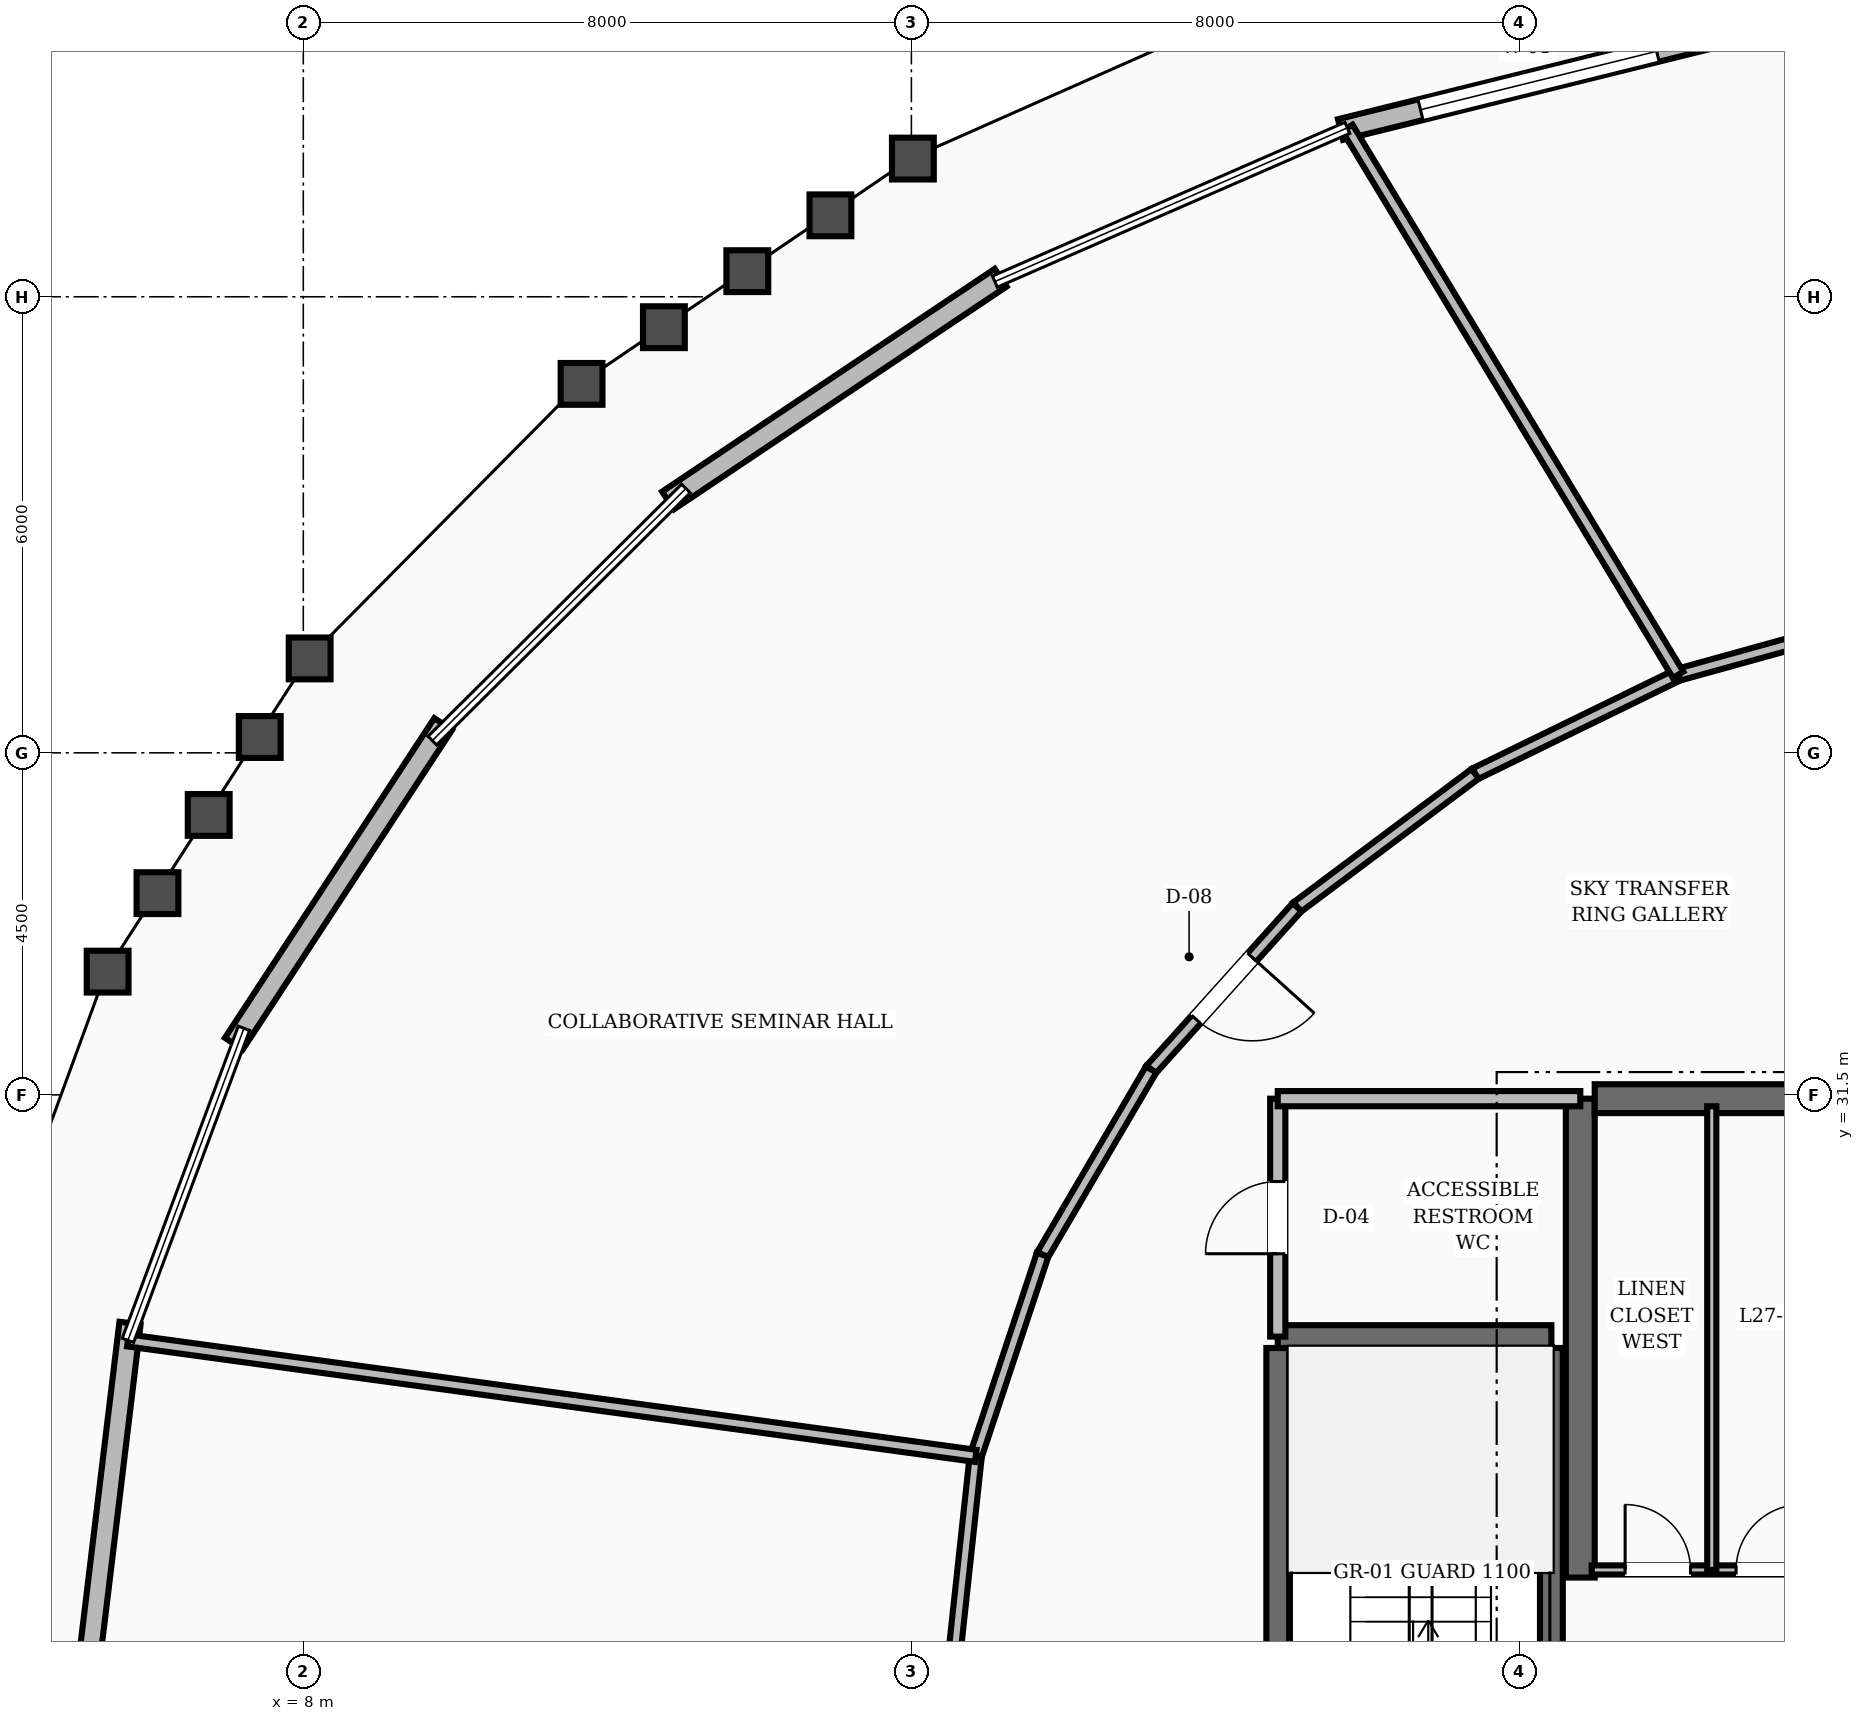
"""IFC4 building model, lengths in metres.
Left out: names, types, materials, properties, quantities, classifications, styles, units other than length and angle.
Written with IfcOpenShell. Run it as: python <this file> out.ifc"""

import sys

from ifc_helpers import new_model, si_unit, direction, frame, frame_2d, origin, place, context, subcontext, project, spatial, rectangle, extrude, element, fill, save


model = new_model("IFC4")
c1 = context("Model", 3, precision=1e-05, world=origin(), true_north=direction((0.0, 1.0)))
c2 = subcontext(c1, "Body", "Model", "MODEL_VIEW")
j1 = project(units=[si_unit("LENGTHUNIT", "METRE"), si_unit("PLANEANGLEUNIT", "RADIAN")], contexts=[c1])
p1 = place(None, origin())
s1 = spatial("IfcSite", under=j1, at=p1, CompositionType="ELEMENT")
p2 = place(p1, origin())
s2 = spatial("IfcBuilding", under=s1, at=p2, CompositionType="ELEMENT")
p3 = place(p2, frame((0.0, 0.0, 106.0)))
s3 = spatial("IfcBuildingStorey", under=s2, at=p3, CompositionType="ELEMENT", Elevation=106.0)
p4 = place(p3, frame((24.8, 25.15, 0.0), z_axis=(0.0, 0.0, 1.0), x_axis=(0.0, 1.0, 0.0)))
e1 = element("IfcWall", 1, at=p4, inside=s3, PredefinedType="SHEAR", context=c2, shape_type="SweptSolid", body=[
    extrude(rectangle(XDim=6.3, YDim=0.38, at=frame_2d((3.15, 0.0))), origin(), (0.0, 0.0, 1.0), 4.8),
])
p5 = place(p3, frame((24.99, 31.45, 0.0), z_axis=(0.0, 0.0, 1.0), x_axis=(1.0, 0.0, 0.0)))
e2 = element("IfcWall", 2, at=p5, inside=s3, PredefinedType="SHEAR", context=c2, shape_type="SweptSolid", body=[
    extrude(rectangle(XDim=3.21, YDim=0.38, at=frame_2d((1.605, 0.0))), origin(), (0.0, 0.0, 1.0), 4.8),
])
for number, where, z_axis, x_axis in (
    (3, (20.82, 19.43, 0.0), (0.0, 0.0, 1.0), (0.0, 1.0, 0.0)),
    (4, (24.42, 19.43, 0.0), (0.0, 0.0, 1.0), (0.0, 1.0, 0.0)),
):
    element("IfcWall", number, at=place(p3, frame(where, z_axis=z_axis, x_axis=x_axis)), inside=s3, PredefinedType="SHEAR", context=c2, shape_type="SweptSolid", body=[
        extrude(rectangle(XDim=8.74, YDim=0.3, at=frame_2d((4.37, 0.0))), origin(), (0.0, 0.0, 1.0), 4.8),
    ])
p6 = place(p3, frame((20.82, 28.32, 0.0), z_axis=(0.0, 0.0, 1.0), x_axis=(1.0, 0.0, 0.0)))
e5 = element("IfcWall", 5, at=p6, inside=s3, PredefinedType="SHEAR", context=c2, shape_type="SweptSolid", body=[
    extrude(rectangle(XDim=3.6, YDim=0.3, at=frame_2d((1.8, 0.0))), origin(), (0.0, 0.0, 1.0), 4.8),
])
p7 = place(p3, frame((26.856, 45.49, 0.0), z_axis=(0.0, 0.0, 1.0), x_axis=(-0.9707123559, -0.240244712954, 0.0)))
e6 = element("IfcWall", 6, at=p7, inside=s3, PredefinedType="STANDARD", context=c2, shape_type="SweptSolid", body=[
    extrude(rectangle(XDim=5.368, YDim=0.28, at=frame_2d((2.684, 0.0))), origin(), (0.0, 0.0, 1.0), 3.71),
])
p8 = place(p7, frame((1.084, 0.0, 0.8)))
e7 = element("IfcOpeningElement", 7, at=p8, cuts=e6, PredefinedType="OPENING", context=c2, shape_type="SweptSolid", body=[
    extrude(rectangle(XDim=3.2, YDim=1.65, at=frame_2d((1.6, 0.825))), frame((0.0, 0.15, 0.0), z_axis=(0.0, -1.0, 0.0), x_axis=(1.0, 0.0, 0.0)), (0.0, 0.0, 1.0), 0.3),
])
p9 = place(p3, frame((17.174, 42.25, 0.0), z_axis=(0.0, 0.0, 1.0), x_axis=(-0.830878855803, -0.556453346633, 0.0)))
e8 = element("IfcWall", 8, at=p9, inside=s3, PredefinedType="STANDARD", context=c2, shape_type="SweptSolid", body=[
    extrude(rectangle(XDim=5.267, YDim=0.28, at=frame_2d((2.633, 0.0))), origin(), (0.0, 0.0, 1.0), 3.71),
])
p10 = place(p3, frame((9.84, 36.378, 0.0), z_axis=(0.0, 0.0, 1.0), x_axis=(-0.54792313188, -0.836528685432, 0.0)))
e9 = element("IfcWall", 9, at=p10, inside=s3, PredefinedType="STANDARD", context=c2, shape_type="SweptSolid", body=[
    extrude(rectangle(XDim=5.027, YDim=0.28, at=frame_2d((2.513, 0.0))), origin(), (0.0, 0.0, 1.0), 3.71),
])
p11 = place(p3, frame((5.72, 28.498, 0.0), z_axis=(0.0, 0.0, 1.0), x_axis=(-0.119800970217, -0.992797928853, 0.0)))
e10 = element("IfcWall", 10, at=p11, inside=s3, PredefinedType="STANDARD", context=c2, shape_type="SweptSolid", body=[
    extrude(rectangle(XDim=4.756, YDim=0.28, at=frame_2d((2.378, 0.0))), origin(), (0.0, 0.0, 1.0), 3.71),
])
p12 = place(p3, frame((20.82, 28.32, 0.0), z_axis=(0.0, 0.0, 1.0), x_axis=(0.0, 1.0, 0.0)))
e11 = element("IfcWall", 11, at=p12, inside=s3, PredefinedType="SOLIDWALL", context=c2, shape_type="SweptSolid", body=[
    extrude(rectangle(XDim=3.13, YDim=0.2, at=frame_2d((1.565, 0.0))), origin(), (0.0, 0.0, 1.0), 3.71),
])
p13 = place(p12, frame((1.09, 0.0, 0.0)))
e12 = element("IfcOpeningElement", 12, at=p13, cuts=e11, PredefinedType="OPENING", context=c2, shape_type="SweptSolid", body=[
    extrude(rectangle(XDim=0.95, YDim=2.1, at=frame_2d((0.475, 1.05))), frame((0.0, 0.11, 0.0), z_axis=(0.0, -1.0, 0.0), x_axis=(1.0, 0.0, 0.0)), (0.0, 0.0, 1.0), 0.22),
])
p14 = place(p3, frame((20.82, 31.45, 0.0), z_axis=(0.0, 0.0, 1.0), x_axis=(1.0, 0.0, 0.0)))
e13 = element("IfcWall", 13, at=p14, inside=s3, PredefinedType="SOLIDWALL", context=c2, shape_type="SweptSolid", body=[
    extrude(rectangle(XDim=3.98, YDim=0.2, at=frame_2d((1.99, 0.0))), origin(), (0.0, 0.0, 1.0), 3.71),
])
p15 = place(p3, frame((24.95, 25.25, 0.0), z_axis=(0.0, 0.0, 1.0), x_axis=(1.0, 0.0, 0.0)))
e14 = element("IfcWall", 14, at=p15, inside=s3, PredefinedType="PARTITIONING", context=c2, shape_type="SweptSolid", body=[
    extrude(rectangle(XDim=3.2, YDim=0.12, at=frame_2d((1.6, 0.0))), origin(), (0.0, 0.0, 1.0), 3.71),
])
p16 = place(p15, frame((0.44, 0.0, 0.0)))
e15 = element("IfcOpeningElement", 15, at=p16, cuts=e14, PredefinedType="OPENING", context=c2, shape_type="SweptSolid", body=[
    extrude(rectangle(XDim=0.86, YDim=2.1, at=frame_2d((0.43, 1.05))), frame((0.0, 0.07, 0.0), z_axis=(0.0, -1.0, 0.0), x_axis=(1.0, 0.0, 0.0)), (0.0, 0.0, 1.0), 0.14),
])
p17 = place(p15, frame((1.9, 0.0, 0.0)))
e16 = element("IfcOpeningElement", 16, at=p17, cuts=e14, PredefinedType="OPENING", context=c2, shape_type="SweptSolid", body=[
    extrude(rectangle(XDim=0.86, YDim=2.1, at=frame_2d((0.43, 1.05))), frame((0.0, 0.07, 0.0), z_axis=(0.0, -1.0, 0.0), x_axis=(1.0, 0.0, 0.0)), (0.0, 0.0, 1.0), 0.14),
])
p18 = place(p3, frame((26.53, 25.25, 0.0), z_axis=(0.0, 0.0, 1.0), x_axis=(0.0, 1.0, 0.0)))
e17 = element("IfcWall", 17, at=p18, inside=s3, PredefinedType="PARTITIONING", context=c2, shape_type="SweptSolid", body=[
    extrude(rectangle(XDim=6.1, YDim=0.12, at=frame_2d((3.05, 0.0))), origin(), (0.0, 0.0, 1.0), 3.71),
])
p19 = place(p3, frame((28.986, 37.829, 0.0), z_axis=(0.0, 0.0, 1.0), x_axis=(-0.963743190464, -0.26683152519, 0.0)))
e18 = element("IfcWall", 18, at=p19, inside=s3, PredefinedType="SOLIDWALL", context=c2, shape_type="SweptSolid", body=[
    extrude(rectangle(XDim=3.008, YDim=0.16, at=frame_2d((1.504, 0.0))), origin(), (0.0, 0.0, 1.0), 3.71),
])
p20 = place(p3, frame((26.087, 37.027, 0.0), z_axis=(0.0, 0.0, 1.0), x_axis=(-0.898755022802, -0.438451147778, 0.0)))
e19 = element("IfcWall", 19, at=p20, inside=s3, PredefinedType="SOLIDWALL", context=c2, shape_type="SweptSolid", body=[
    extrude(rectangle(XDim=2.972, YDim=0.16, at=frame_2d((1.486, 0.0))), origin(), (0.0, 0.0, 1.0), 3.71),
])
p21 = place(p3, frame((23.417, 35.724, 0.0), z_axis=(0.0, 0.0, 1.0), x_axis=(-0.800420462314, -0.599438973966, 0.0)))
e20 = element("IfcWall", 20, at=p21, inside=s3, PredefinedType="SOLIDWALL", context=c2, shape_type="SweptSolid", body=[
    extrude(rectangle(XDim=2.925, YDim=0.16, at=frame_2d((1.462, 0.0))), origin(), (0.0, 0.0, 1.0), 3.71),
])
p22 = place(p3, frame((21.075, 33.97, 0.0), z_axis=(0.0, 0.0, 1.0), x_axis=(-0.668645478294, -0.743581350194, 0.0)))
e21 = element("IfcWall", 21, at=p22, inside=s3, PredefinedType="SOLIDWALL", context=c2, shape_type="SweptSolid", body=[
    extrude(rectangle(XDim=2.874, YDim=0.16, at=frame_2d((1.437, 0.0))), origin(), (0.0, 0.0, 1.0), 3.71),
])
p23 = place(p22, frame((0.887, 0.0, 0.0)))
e22 = element("IfcOpeningElement", 22, at=p23, cuts=e21, PredefinedType="OPENING", context=c2, shape_type="SweptSolid", body=[
    extrude(rectangle(XDim=1.1, YDim=2.1, at=frame_2d((0.55, 1.05))), frame((0.0, 0.09, 0.0), z_axis=(0.0, -1.0, 0.0), x_axis=(1.0, 0.0, 0.0)), (0.0, 0.0, 1.0), 0.18),
])
p24 = place(p3, frame((19.154, 31.833, 0.0), z_axis=(0.0, 0.0, 1.0), x_axis=(-0.505380130961, -0.862896820732, 0.0)))
e23 = element("IfcWall", 23, at=p24, inside=s3, PredefinedType="SOLIDWALL", context=c2, shape_type="SweptSolid", body=[
    extrude(rectangle(XDim=2.825, YDim=0.16, at=frame_2d((1.413, 0.0))), origin(), (0.0, 0.0, 1.0), 3.71),
])
p25 = place(p3, frame((17.726, 29.396, 0.0), z_axis=(0.0, 0.0, 1.0), x_axis=(-0.315413058649, -0.948954478589, 0.0)))
e24 = element("IfcWall", 24, at=p25, inside=s3, PredefinedType="SOLIDWALL", context=c2, shape_type="SweptSolid", body=[
    extrude(rectangle(XDim=2.787, YDim=0.16, at=frame_2d((1.394, 0.0))), origin(), (0.0, 0.0, 1.0), 3.71),
])
p26 = place(p3, frame((16.847, 26.751, 0.0), z_axis=(0.0, 0.0, 1.0), x_axis=(-0.107302680622, -0.994226400138, 0.0)))
e25 = element("IfcWall", 25, at=p26, inside=s3, PredefinedType="SOLIDWALL", context=c2, shape_type="SweptSolid", body=[
    extrude(rectangle(XDim=2.767, YDim=0.16, at=frame_2d((1.383, 0.0))), origin(), (0.0, 0.0, 1.0), 3.71),
])
p27 = place(p3, frame((26.087, 37.027, 0.0), z_axis=(0.0, 0.0, 1.0), x_axis=(-0.517540961526, 0.85565843252, 0.0)))
e26 = element("IfcWall", 26, at=p27, inside=s3, PredefinedType="SOLIDWALL", context=c2, shape_type="SweptSolid", body=[
    extrude(rectangle(XDim=8.409, YDim=0.16, at=frame_2d((4.205, 0.0))), origin(), (0.0, 0.0, 1.0), 3.71),
])
p28 = place(p3, frame((16.847, 26.751, 0.0), z_axis=(0.0, 0.0, 1.0), x_axis=(-0.99084850252, 0.134978683703, 0.0)))
e27 = element("IfcWall", 27, at=p28, inside=s3, PredefinedType="SOLIDWALL", context=c2, shape_type="SweptSolid", body=[
    extrude(rectangle(XDim=11.258, YDim=0.16, at=frame_2d((5.629, 0.0))), origin(), (0.0, 0.0, 1.0), 3.71),
])
p29 = place(p8, origin())
e28 = element("IfcWindow", 28, at=p29, inside=s3, PartitioningType="SINGLE_PANEL", PredefinedType="WINDOW", context=c2, shape_type="SweptSolid", body=[
    extrude(rectangle(XDim=3.2, YDim=1.65, at=frame_2d((1.6, 0.825))), frame((0.0, 0.03, 0.0), z_axis=(0.0, -1.0, 0.0), x_axis=(1.0, 0.0, 0.0)), (0.0, 0.0, 1.0), 0.06),
])
fill(e7, e28)
p30 = place(p13, origin())
e29 = element("IfcDoor", 29, at=p30, inside=s3, OperationType="SINGLE_SWING_LEFT", PredefinedType="DOOR", context=c2, shape_type="SweptSolid", body=[
    extrude(rectangle(XDim=0.95, YDim=2.1, at=frame_2d((0.475, 1.05))), frame((0.0, 0.025, 0.0), z_axis=(0.0, -1.0, 0.0), x_axis=(1.0, 0.0, 0.0)), (0.0, 0.0, 1.0), 0.05),
])
fill(e12, e29)
p31 = place(p16, origin())
e30 = element("IfcDoor", 30, at=p31, inside=s3, OperationType="SINGLE_SWING_LEFT", PredefinedType="DOOR", context=c2, shape_type="SweptSolid", body=[
    extrude(rectangle(XDim=0.86, YDim=2.1, at=frame_2d((0.43, 1.05))), frame((0.0, 0.025, 0.0), z_axis=(0.0, -1.0, 0.0), x_axis=(1.0, 0.0, 0.0)), (0.0, 0.0, 1.0), 0.05),
])
fill(e15, e30)
p32 = place(p17, origin())
e31 = element("IfcDoor", 31, at=p32, inside=s3, OperationType="SINGLE_SWING_RIGHT", PredefinedType="DOOR", context=c2, shape_type="SweptSolid", body=[
    extrude(rectangle(XDim=0.86, YDim=2.1, at=frame_2d((0.43, 1.05))), frame((0.0, 0.025, 0.0), z_axis=(0.0, -1.0, 0.0), x_axis=(1.0, 0.0, 0.0)), (0.0, 0.0, 1.0), 0.05),
])
fill(e16, e31)
p33 = place(p23, origin())
e32 = element("IfcDoor", 32, at=p33, inside=s3, OperationType="SINGLE_SWING_LEFT", PredefinedType="DOOR", context=c2, shape_type="SweptSolid", body=[
    extrude(rectangle(XDim=1.1, YDim=2.1, at=frame_2d((0.55, 1.05))), frame((0.0, 0.025, 0.0), z_axis=(0.0, -1.0, 0.0), x_axis=(1.0, 0.0, 0.0)), (0.0, 0.0, 1.0), 0.05),
])
fill(e22, e32)
save(model, sys.argv[1])
